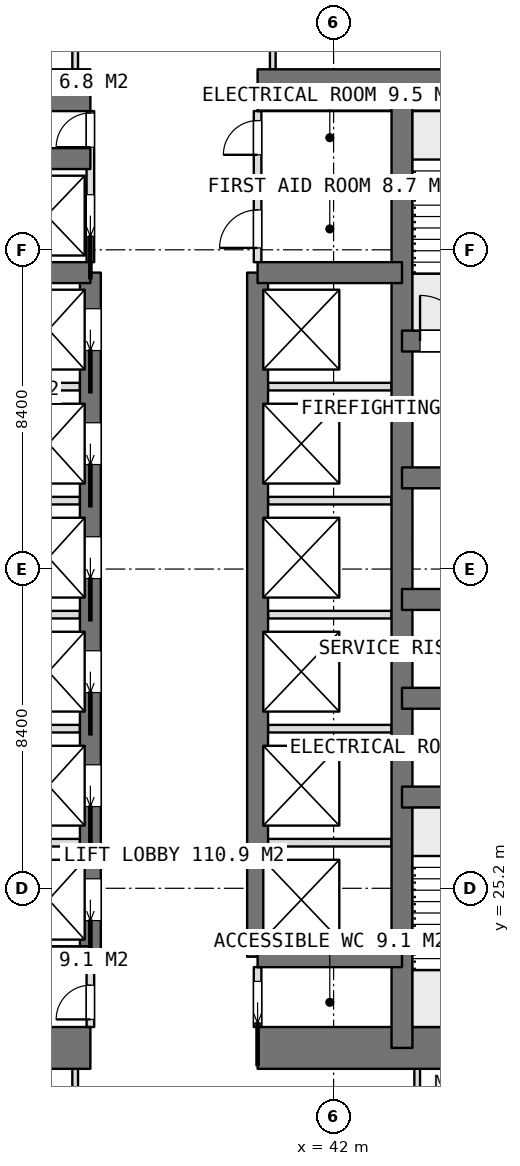
"""IFC4 building model, lengths in metres.
Left out: names, types, materials, properties, quantities, classifications, styles, units other than length and angle.
Written with IfcOpenShell. Run it as: python <this file> out.ifc"""

import sys

from ifc_helpers import new_model, si_unit, direction, frame, frame_2d, origin, place, context, subcontext, project, spatial, rectangle, extrude, element, fill, save


model = new_model("IFC4")
c1 = context("Model", 3, precision=1e-05, world=origin(), true_north=direction((0.0, 1.0)))
c2 = subcontext(c1, "Body", "Model", "MODEL_VIEW")
j1 = project(units=[si_unit("LENGTHUNIT", "METRE"), si_unit("PLANEANGLEUNIT", "RADIAN")], contexts=[c1])
p1 = place(None, origin())
s1 = spatial("IfcSite", under=j1, at=p1, CompositionType="ELEMENT")
p2 = place(p1, origin())
s2 = spatial("IfcBuilding", under=s1, at=p2, CompositionType="ELEMENT")
p3 = place(p2, frame((0.0, 0.0, 40.4)))
s3 = spatial("IfcBuildingStorey", under=s2, at=p3, CompositionType="ELEMENT", Elevation=40.4)
p4 = place(p3, frame((25.2, 21.0, 0.0), z_axis=(0.0, 0.0, 1.0), x_axis=(1.0, 0.0, 0.0)))
e1 = element("IfcWall", 1, at=p4, inside=s3, PredefinedType="SHEAR", context=c2, shape_type="SweptSolid", body=[
    extrude(rectangle(XDim=10.4, YDim=1.1, at=frame_2d((5.2, 0.0))), origin(), (0.0, 0.0, 1.0), 3.75),
])
p5 = place(p3, frame((40.0, 21.0, 0.0), z_axis=(0.0, 0.0, 1.0), x_axis=(1.0, 0.0, 0.0)))
e2 = element("IfcWall", 2, at=p5, inside=s3, PredefinedType="SHEAR", context=c2, shape_type="SweptSolid", body=[
    extrude(rectangle(XDim=10.4, YDim=1.1, at=frame_2d((5.2, 0.0))), origin(), (0.0, 0.0, 1.0), 3.75),
])
p6 = place(p3, frame((25.2, 46.2, 0.0), z_axis=(0.0, 0.0, 1.0), x_axis=(1.0, 0.0, 0.0)))
e3 = element("IfcWall", 3, at=p6, inside=s3, PredefinedType="SHEAR", context=c2, shape_type="SweptSolid", body=[
    extrude(rectangle(XDim=10.4, YDim=1.1, at=frame_2d((5.2, 0.0))), origin(), (0.0, 0.0, 1.0), 3.75),
])
p7 = place(p3, frame((40.0, 46.2, 0.0), z_axis=(0.0, 0.0, 1.0), x_axis=(1.0, 0.0, 0.0)))
e4 = element("IfcWall", 4, at=p7, inside=s3, PredefinedType="SHEAR", context=c2, shape_type="SweptSolid", body=[
    extrude(rectangle(XDim=10.4, YDim=1.1, at=frame_2d((5.2, 0.0))), origin(), (0.0, 0.0, 1.0), 3.75),
])
p8 = place(p3, frame((43.8, 21.0, 0.0), z_axis=(0.0, 0.0, 1.0), x_axis=(0.0, 1.0, 0.0)))
e5 = element("IfcWall", 5, at=p8, inside=s3, PredefinedType="SHEAR", context=c2, shape_type="SweptSolid", body=[
    extrude(rectangle(XDim=25.2, YDim=0.55, at=frame_2d((12.6, 0.0))), origin(), (0.0, 0.0, 1.0), 3.75),
])
p9 = place(p3, frame((35.6, 23.4, 0.0), z_axis=(0.0, 0.0, 1.0), x_axis=(0.0, 1.0, 0.0)))
e6 = element("IfcWall", 6, at=p9, inside=s3, PredefinedType="SHEAR", context=c2, shape_type="SweptSolid", body=[
    extrude(rectangle(XDim=18.0, YDim=0.55, at=frame_2d((9.0, 0.0))), origin(), (0.0, 0.0, 1.0), 3.75),
])
p10 = place(p9, frame((0.95, 0.0, 0.0)))
e7 = element("IfcOpeningElement", 7, at=p10, cuts=e6, PredefinedType="OPENING", context=c2, shape_type="SweptSolid", body=[
    extrude(rectangle(XDim=1.1, YDim=2.1, at=frame_2d((0.55, 1.05))), frame((0.0, 0.285, 0.0), z_axis=(0.0, -1.0, 0.0), x_axis=(1.0, 0.0, 0.0)), (0.0, 0.0, 1.0), 0.57),
])
p11 = place(p9, frame((3.95, 0.0, 0.0)))
e8 = element("IfcOpeningElement", 8, at=p11, cuts=e6, PredefinedType="OPENING", context=c2, shape_type="SweptSolid", body=[
    extrude(rectangle(XDim=1.1, YDim=2.1, at=frame_2d((0.55, 1.05))), frame((0.0, 0.285, 0.0), z_axis=(0.0, -1.0, 0.0), x_axis=(1.0, 0.0, 0.0)), (0.0, 0.0, 1.0), 0.57),
])
p12 = place(p9, frame((6.95, 0.0, 0.0)))
e9 = element("IfcOpeningElement", 9, at=p12, cuts=e6, PredefinedType="OPENING", context=c2, shape_type="SweptSolid", body=[
    extrude(rectangle(XDim=1.1, YDim=2.1, at=frame_2d((0.55, 1.05))), frame((0.0, 0.285, 0.0), z_axis=(0.0, -1.0, 0.0), x_axis=(1.0, 0.0, 0.0)), (0.0, 0.0, 1.0), 0.57),
])
p13 = place(p9, frame((9.95, 0.0, 0.0)))
e10 = element("IfcOpeningElement", 10, at=p13, cuts=e6, PredefinedType="OPENING", context=c2, shape_type="SweptSolid", body=[
    extrude(rectangle(XDim=1.1, YDim=2.1, at=frame_2d((0.55, 1.05))), frame((0.0, 0.285, 0.0), z_axis=(0.0, -1.0, 0.0), x_axis=(1.0, 0.0, 0.0)), (0.0, 0.0, 1.0), 0.57),
])
p14 = place(p9, frame((12.95, 0.0, 0.0)))
e11 = element("IfcOpeningElement", 11, at=p14, cuts=e6, PredefinedType="OPENING", context=c2, shape_type="SweptSolid", body=[
    extrude(rectangle(XDim=1.1, YDim=2.1, at=frame_2d((0.55, 1.05))), frame((0.0, 0.285, 0.0), z_axis=(0.0, -1.0, 0.0), x_axis=(1.0, 0.0, 0.0)), (0.0, 0.0, 1.0), 0.57),
])
p15 = place(p9, frame((15.95, 0.0, 0.0)))
e12 = element("IfcOpeningElement", 12, at=p15, cuts=e6, PredefinedType="OPENING", context=c2, shape_type="SweptSolid", body=[
    extrude(rectangle(XDim=1.1, YDim=2.1, at=frame_2d((0.55, 1.05))), frame((0.0, 0.285, 0.0), z_axis=(0.0, -1.0, 0.0), x_axis=(1.0, 0.0, 0.0)), (0.0, 0.0, 1.0), 0.57),
])
p16 = place(p3, frame((40.0, 23.4, 0.0), z_axis=(0.0, 0.0, 1.0), x_axis=(0.0, 1.0, 0.0)))
e13 = element("IfcWall", 13, at=p16, inside=s3, PredefinedType="SHEAR", context=c2, shape_type="SweptSolid", body=[
    extrude(rectangle(XDim=18.0, YDim=0.55, at=frame_2d((9.0, 0.0))), origin(), (0.0, 0.0, 1.0), 3.75),
])
for number, where, z_axis, x_axis in (
    (14, (31.8, 23.4, 0.0), (0.0, 0.0, 1.0), (1.0, 0.0, 0.0)),
    (15, (31.8, 41.4, 0.0), (0.0, 0.0, 1.0), (1.0, 0.0, 0.0)),
    (16, (31.8, 44.4, 0.0), (0.0, 0.0, 1.0), (1.0, 0.0, 0.0)),
    (17, (40.0, 23.4, 0.0), (0.0, 0.0, 1.0), (1.0, 0.0, 0.0)),
    (18, (40.0, 41.4, 0.0), (0.0, 0.0, 1.0), (1.0, 0.0, 0.0)),
):
    element("IfcWall", number, at=place(p3, frame(where, z_axis=z_axis, x_axis=x_axis)), inside=s3, PredefinedType="SHEAR", context=c2, shape_type="SweptSolid", body=[
        extrude(rectangle(XDim=3.8, YDim=0.55, at=frame_2d((1.9, 0.0))), origin(), (0.0, 0.0, 1.0), 3.75),
    ])
for number, where, z_axis, x_axis in (
    (19, (43.8, 27.6, 0.0), (0.0, 0.0, 1.0), (1.0, 0.0, 0.0)),
    (20, (43.8, 30.2, 0.0), (0.0, 0.0, 1.0), (1.0, 0.0, 0.0)),
    (21, (43.8, 32.8, 0.0), (0.0, 0.0, 1.0), (1.0, 0.0, 0.0)),
):
    element("IfcWall", number, at=place(p3, frame(where, z_axis=z_axis, x_axis=x_axis)), inside=s3, PredefinedType="SHEAR", context=c2, shape_type="SweptSolid", body=[
        extrude(rectangle(XDim=6.6, YDim=0.55, at=frame_2d((3.3, 0.0))), origin(), (0.0, 0.0, 1.0), 3.75),
    ])
p17 = place(p3, frame((43.8, 36.0, 0.0), z_axis=(0.0, 0.0, 1.0), x_axis=(1.0, 0.0, 0.0)))
e22 = element("IfcWall", 22, at=p17, inside=s3, PredefinedType="SHEAR", context=c2, shape_type="SweptSolid", body=[
    extrude(rectangle(XDim=6.6, YDim=0.55, at=frame_2d((3.3, 0.0))), origin(), (0.0, 0.0, 1.0), 3.75),
])
p18 = place(p17, frame((2.65, 0.0, 0.0)))
e23 = element("IfcOpeningElement", 23, at=p18, cuts=e22, PredefinedType="OPENING", context=c2, shape_type="SweptSolid", body=[
    extrude(rectangle(XDim=1.3, YDim=2.1, at=frame_2d((0.65, 1.05))), frame((0.0, 0.285, 0.0), z_axis=(0.0, -1.0, 0.0), x_axis=(1.0, 0.0, 0.0)), (0.0, 0.0, 1.0), 0.57),
])
p19 = place(p3, frame((43.8, 39.6, 0.0), z_axis=(0.0, 0.0, 1.0), x_axis=(1.0, 0.0, 0.0)))
e24 = element("IfcWall", 24, at=p19, inside=s3, PredefinedType="SHEAR", context=c2, shape_type="SweptSolid", body=[
    extrude(rectangle(XDim=6.6, YDim=0.55, at=frame_2d((3.3, 0.0))), origin(), (0.0, 0.0, 1.0), 3.75),
])
p20 = place(p19, frame((0.475, 0.0, 0.0)))
e25 = element("IfcOpeningElement", 25, at=p20, cuts=e24, PredefinedType="OPENING", context=c2, shape_type="SweptSolid", body=[
    extrude(rectangle(XDim=1.2, YDim=2.1, at=frame_2d((0.6, 1.05))), frame((0.0, 0.285, 0.0), z_axis=(0.0, -1.0, 0.0), x_axis=(1.0, 0.0, 0.0)), (0.0, 0.0, 1.0), 0.57),
])
for number, where, z_axis, x_axis in (
    (26, (32.075, 26.4, 0.0), (0.0, 0.0, 1.0), (1.0, 0.0, 0.0)),
    (27, (32.075, 29.4, 0.0), (0.0, 0.0, 1.0), (1.0, 0.0, 0.0)),
    (28, (32.075, 32.4, 0.0), (0.0, 0.0, 1.0), (1.0, 0.0, 0.0)),
    (29, (32.075, 35.4, 0.0), (0.0, 0.0, 1.0), (1.0, 0.0, 0.0)),
    (30, (32.075, 38.4, 0.0), (0.0, 0.0, 1.0), (1.0, 0.0, 0.0)),
    (31, (40.275, 26.4, 0.0), (0.0, 0.0, 1.0), (1.0, 0.0, 0.0)),
    (32, (40.275, 29.4, 0.0), (0.0, 0.0, 1.0), (1.0, 0.0, 0.0)),
    (33, (40.275, 32.4, 0.0), (0.0, 0.0, 1.0), (1.0, 0.0, 0.0)),
    (34, (40.275, 35.4, 0.0), (0.0, 0.0, 1.0), (1.0, 0.0, 0.0)),
    (35, (40.275, 38.4, 0.0), (0.0, 0.0, 1.0), (1.0, 0.0, 0.0)),
):
    element("IfcWall", number, at=place(p3, frame(where, z_axis=z_axis, x_axis=x_axis)), inside=s3, PredefinedType="PARTITIONING", context=c2, shape_type="SweptSolid", body=[
        extrude(rectangle(XDim=3.25, YDim=0.2, at=frame_2d((1.625, 0.0))), origin(), (0.0, 0.0, 1.0), 3.5),
    ])
p21 = place(p3, frame((40.0, 21.55, 0.0), z_axis=(0.0, 0.0, 1.0), x_axis=(0.0, 1.0, 0.0)))
e36 = element("IfcWall", 36, at=p21, inside=s3, PredefinedType="PARTITIONING", context=c2, shape_type="SweptSolid", body=[
    extrude(rectangle(XDim=1.575, YDim=0.2, at=frame_2d((0.788, 0.0))), origin(), (0.0, 0.0, 1.0), 3.5),
])
p22 = place(p21, frame((0.1, 0.0, 0.0)))
e37 = element("IfcOpeningElement", 37, at=p22, cuts=e36, PredefinedType="OPENING", context=c2, shape_type="SweptSolid", body=[
    extrude(rectangle(XDim=1.1, YDim=2.1, at=frame_2d((0.55, 1.05))), frame((0.0, 0.11, 0.0), z_axis=(0.0, -1.0, 0.0), x_axis=(1.0, 0.0, 0.0)), (0.0, 0.0, 1.0), 0.22),
])
p23 = place(p3, frame((40.0, 41.675, 0.0), z_axis=(0.0, 0.0, 1.0), x_axis=(0.0, 1.0, 0.0)))
e38 = element("IfcWall", 38, at=p23, inside=s3, PredefinedType="PARTITIONING", context=c2, shape_type="SweptSolid", body=[
    extrude(rectangle(XDim=3.975, YDim=0.2, at=frame_2d((1.987, 0.0))), origin(), (0.0, 0.0, 1.0), 3.5),
])
p24 = place(p23, frame((2.825, 0.0, 0.0)))
e39 = element("IfcOpeningElement", 39, at=p24, cuts=e38, PredefinedType="OPENING", context=c2, shape_type="SweptSolid", body=[
    extrude(rectangle(XDim=0.9, YDim=2.1, at=frame_2d((0.45, 1.05))), frame((0.0, 0.11, 0.0), z_axis=(0.0, -1.0, 0.0), x_axis=(1.0, 0.0, 0.0)), (0.0, 0.0, 1.0), 0.22),
])
p25 = place(p23, frame((0.375, 0.0, 0.0)))
e40 = element("IfcOpeningElement", 40, at=p25, cuts=e38, PredefinedType="OPENING", context=c2, shape_type="SweptSolid", body=[
    extrude(rectangle(XDim=1.0, YDim=2.1, at=frame_2d((0.5, 1.05))), frame((0.0, 0.11, 0.0), z_axis=(0.0, -1.0, 0.0), x_axis=(1.0, 0.0, 0.0)), (0.0, 0.0, 1.0), 0.22),
])
p26 = place(p3, frame((35.6, 41.675, 0.0), z_axis=(0.0, 0.0, 1.0), x_axis=(0.0, 1.0, 0.0)))
e41 = element("IfcWall", 41, at=p26, inside=s3, PredefinedType="PARTITIONING", context=c2, shape_type="SweptSolid", body=[
    extrude(rectangle(XDim=3.975, YDim=0.2, at=frame_2d((1.987, 0.0))), origin(), (0.0, 0.0, 1.0), 3.5),
])
p27 = place(p26, frame((3.025, 0.0, 0.0)))
e42 = element("IfcOpeningElement", 42, at=p27, cuts=e41, PredefinedType="OPENING", context=c2, shape_type="SweptSolid", body=[
    extrude(rectangle(XDim=0.9, YDim=2.1, at=frame_2d((0.45, 1.05))), frame((0.0, 0.11, 0.0), z_axis=(0.0, -1.0, 0.0), x_axis=(1.0, 0.0, 0.0)), (0.0, 0.0, 1.0), 0.22),
])
p28 = place(p26, frame((0.675, 0.0, 0.0)))
e43 = element("IfcOpeningElement", 43, at=p28, cuts=e41, PredefinedType="OPENING", context=c2, shape_type="SweptSolid", body=[
    extrude(rectangle(XDim=1.1, YDim=2.1, at=frame_2d((0.55, 1.05))), frame((0.0, 0.11, 0.0), z_axis=(0.0, -1.0, 0.0), x_axis=(1.0, 0.0, 0.0)), (0.0, 0.0, 1.0), 0.22),
])
p29 = place(p3, frame((35.6, 21.55, 0.0), z_axis=(0.0, 0.0, 1.0), x_axis=(0.0, 1.0, 0.0)))
e44 = element("IfcWall", 44, at=p29, inside=s3, PredefinedType="PARTITIONING", context=c2, shape_type="SweptSolid", body=[
    extrude(rectangle(XDim=1.575, YDim=0.2, at=frame_2d((0.788, 0.0))), origin(), (0.0, 0.0, 1.0), 3.5),
])
p30 = place(p29, frame((0.2, 0.0, 0.0)))
e45 = element("IfcOpeningElement", 45, at=p30, cuts=e44, PredefinedType="OPENING", context=c2, shape_type="SweptSolid", body=[
    extrude(rectangle(XDim=0.9, YDim=2.1, at=frame_2d((0.45, 1.05))), frame((0.0, 0.11, 0.0), z_axis=(0.0, -1.0, 0.0), x_axis=(1.0, 0.0, 0.0)), (0.0, 0.0, 1.0), 0.22),
])
p31 = place(p3, frame((40.0, 43.7, 0.0), z_axis=(0.0, 0.0, 1.0), x_axis=(1.0, 0.0, 0.0)))
e46 = element("IfcWall", 46, at=p31, inside=s3, PredefinedType="PARTITIONING", context=c2, shape_type="SweptSolid", body=[
    extrude(rectangle(XDim=3.525, YDim=0.2, at=frame_2d((1.762, 0.0))), origin(), (0.0, 0.0, 1.0), 3.5),
])
for number, where, z_axis, x_axis in (
    (47, (40.4, 46.75, 0.0), (0.0, 0.0, 1.0), (0.0, 1.0, 0.0)),
    (48, (35.2, 46.75, 0.0), (0.0, 0.0, 1.0), (0.0, 1.0, 0.0)),
    (49, (35.2, 17.875, 0.0), (0.0, 0.0, 1.0), (0.0, 1.0, 0.0)),
    (50, (44.2, 17.875, 0.0), (0.0, 0.0, 1.0), (0.0, 1.0, 0.0)),
):
    element("IfcWall", number, at=place(p3, frame(where, z_axis=z_axis, x_axis=x_axis)), inside=s3, PredefinedType="PARTITIONING", context=c2, shape_type="SweptSolid", body=[
        extrude(rectangle(XDim=2.575, YDim=0.15, at=frame_2d((1.288, 0.0))), origin(), (0.0, 0.0, 1.0), 3.5),
    ])
p32 = place(p22, origin())
e51 = element("IfcDoor", 51, at=p32, inside=s3, OperationType="SLIDING_TO_LEFT", PredefinedType="DOOR", context=c2, shape_type="SweptSolid", body=[
    extrude(rectangle(XDim=1.1, YDim=2.1, at=frame_2d((0.55, 1.05))), frame((0.0, 0.025, 0.0), z_axis=(0.0, -1.0, 0.0), x_axis=(1.0, 0.0, 0.0)), (0.0, 0.0, 1.0), 0.05),
])
fill(e37, e51)
p33 = place(p30, origin())
e52 = element("IfcDoor", 52, at=p33, inside=s3, OperationType="SINGLE_SWING_LEFT", PredefinedType="DOOR", context=c2, shape_type="SweptSolid", body=[
    extrude(rectangle(XDim=0.9, YDim=2.1, at=frame_2d((0.45, 1.05))), frame((0.0, 0.025, 0.0), z_axis=(0.0, -1.0, 0.0), x_axis=(1.0, 0.0, 0.0)), (0.0, 0.0, 1.0), 0.05),
])
fill(e45, e52)
p34 = place(p24, origin())
e53 = element("IfcDoor", 53, at=p34, inside=s3, OperationType="SINGLE_SWING_LEFT", PredefinedType="DOOR", context=c2, shape_type="SweptSolid", body=[
    extrude(rectangle(XDim=0.9, YDim=2.1, at=frame_2d((0.45, 1.05))), frame((0.0, 0.025, 0.0), z_axis=(0.0, -1.0, 0.0), x_axis=(1.0, 0.0, 0.0)), (0.0, 0.0, 1.0), 0.05),
])
fill(e39, e53)
p35 = place(p25, origin())
e54 = element("IfcDoor", 54, at=p35, inside=s3, OperationType="SINGLE_SWING_LEFT", PredefinedType="DOOR", context=c2, shape_type="SweptSolid", body=[
    extrude(rectangle(XDim=1.0, YDim=2.1, at=frame_2d((0.5, 1.05))), frame((0.0, 0.025, 0.0), z_axis=(0.0, -1.0, 0.0), x_axis=(1.0, 0.0, 0.0)), (0.0, 0.0, 1.0), 0.05),
])
fill(e40, e54)
p36 = place(p27, origin())
e55 = element("IfcDoor", 55, at=p36, inside=s3, OperationType="SINGLE_SWING_LEFT", PredefinedType="DOOR", context=c2, shape_type="SweptSolid", body=[
    extrude(rectangle(XDim=0.9, YDim=2.1, at=frame_2d((0.45, 1.05))), frame((0.0, 0.025, 0.0), z_axis=(0.0, -1.0, 0.0), x_axis=(1.0, 0.0, 0.0)), (0.0, 0.0, 1.0), 0.05),
])
fill(e42, e55)
p37 = place(p10, origin())
e56 = element("IfcDoor", 56, at=p37, inside=s3, OperationType="SLIDING_TO_LEFT", PredefinedType="USERDEFINED", context=c2, shape_type="SweptSolid", body=[
    extrude(rectangle(XDim=1.1, YDim=2.1, at=frame_2d((0.55, 1.05))), frame((0.0, 0.025, 0.0), z_axis=(0.0, -1.0, 0.0), x_axis=(1.0, 0.0, 0.0)), (0.0, 0.0, 1.0), 0.05),
])
fill(e7, e56)
p38 = place(p11, origin())
e57 = element("IfcDoor", 57, at=p38, inside=s3, OperationType="SLIDING_TO_LEFT", PredefinedType="USERDEFINED", context=c2, shape_type="SweptSolid", body=[
    extrude(rectangle(XDim=1.1, YDim=2.1, at=frame_2d((0.55, 1.05))), frame((0.0, 0.025, 0.0), z_axis=(0.0, -1.0, 0.0), x_axis=(1.0, 0.0, 0.0)), (0.0, 0.0, 1.0), 0.05),
])
fill(e8, e57)
p39 = place(p12, origin())
e58 = element("IfcDoor", 58, at=p39, inside=s3, OperationType="SLIDING_TO_LEFT", PredefinedType="USERDEFINED", context=c2, shape_type="SweptSolid", body=[
    extrude(rectangle(XDim=1.1, YDim=2.1, at=frame_2d((0.55, 1.05))), frame((0.0, 0.025, 0.0), z_axis=(0.0, -1.0, 0.0), x_axis=(1.0, 0.0, 0.0)), (0.0, 0.0, 1.0), 0.05),
])
fill(e9, e58)
p40 = place(p13, origin())
e59 = element("IfcDoor", 59, at=p40, inside=s3, OperationType="SLIDING_TO_LEFT", PredefinedType="USERDEFINED", context=c2, shape_type="SweptSolid", body=[
    extrude(rectangle(XDim=1.1, YDim=2.1, at=frame_2d((0.55, 1.05))), frame((0.0, 0.025, 0.0), z_axis=(0.0, -1.0, 0.0), x_axis=(1.0, 0.0, 0.0)), (0.0, 0.0, 1.0), 0.05),
])
fill(e10, e59)
p41 = place(p14, origin())
e60 = element("IfcDoor", 60, at=p41, inside=s3, OperationType="SLIDING_TO_LEFT", PredefinedType="USERDEFINED", context=c2, shape_type="SweptSolid", body=[
    extrude(rectangle(XDim=1.1, YDim=2.1, at=frame_2d((0.55, 1.05))), frame((0.0, 0.025, 0.0), z_axis=(0.0, -1.0, 0.0), x_axis=(1.0, 0.0, 0.0)), (0.0, 0.0, 1.0), 0.05),
])
fill(e11, e60)
p42 = place(p15, origin())
e61 = element("IfcDoor", 61, at=p42, inside=s3, OperationType="SLIDING_TO_LEFT", PredefinedType="USERDEFINED", context=c2, shape_type="SweptSolid", body=[
    extrude(rectangle(XDim=1.1, YDim=2.1, at=frame_2d((0.55, 1.05))), frame((0.0, 0.025, 0.0), z_axis=(0.0, -1.0, 0.0), x_axis=(1.0, 0.0, 0.0)), (0.0, 0.0, 1.0), 0.05),
])
fill(e12, e61)
p43 = place(p28, origin())
e62 = element("IfcDoor", 62, at=p43, inside=s3, OperationType="SLIDING_TO_LEFT", PredefinedType="USERDEFINED", context=c2, shape_type="SweptSolid", body=[
    extrude(rectangle(XDim=1.1, YDim=2.1, at=frame_2d((0.55, 1.05))), frame((0.0, 0.025, 0.0), z_axis=(0.0, -1.0, 0.0), x_axis=(1.0, 0.0, 0.0)), (0.0, 0.0, 1.0), 0.05),
])
fill(e43, e62)
p44 = place(p20, origin())
e63 = element("IfcDoor", 63, at=p44, inside=s3, OperationType="SINGLE_SWING_RIGHT", PredefinedType="DOOR", context=c2, shape_type="SweptSolid", body=[
    extrude(rectangle(XDim=1.2, YDim=2.1, at=frame_2d((0.6, 1.05))), frame((0.0, 0.025, 0.0), z_axis=(0.0, -1.0, 0.0), x_axis=(1.0, 0.0, 0.0)), (0.0, 0.0, 1.0), 0.05),
])
fill(e25, e63)
save(model, sys.argv[1])
